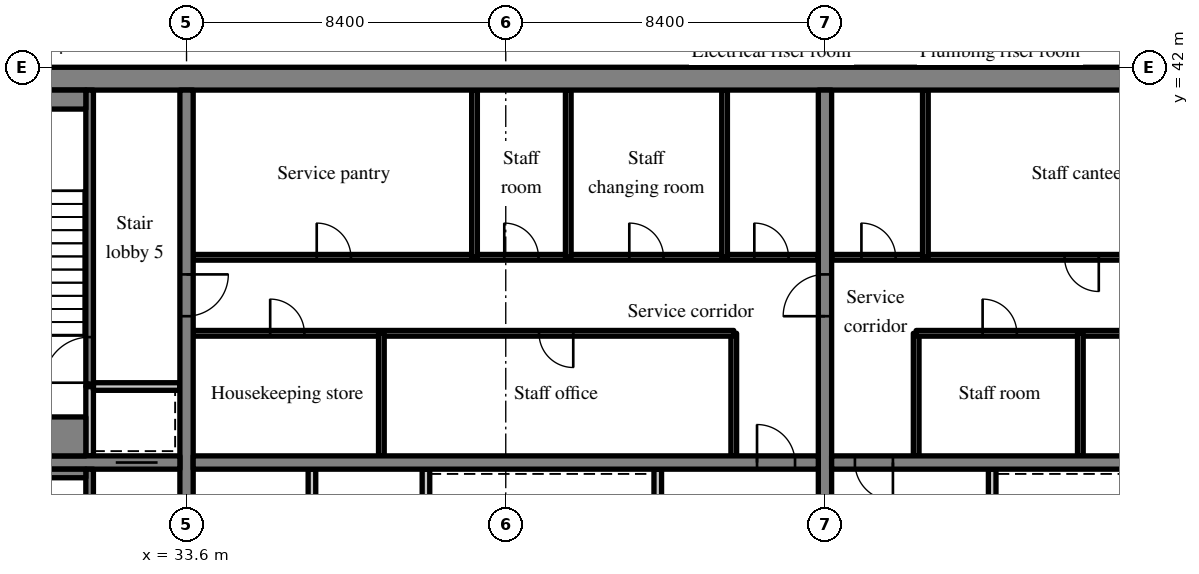
"""IFC4 building model, lengths in metres.
Left out: names, types, materials, properties, quantities, classifications, styles, units other than length and angle.
Written with IfcOpenShell. Run it as: python <this file> out.ifc"""

import sys

from ifc_helpers import new_model, si_unit, direction, frame, frame_2d, origin, place, context, subcontext, project, spatial, rectangle, extrude, source, transform, mapped, element, fill, save


model = new_model("IFC4")
c1 = context("Model", 3, precision=1e-05, world=origin(), true_north=direction((0.0, 1.0)))
c2 = subcontext(c1, "Body", "Model", "MODEL_VIEW")
j1 = project(units=[si_unit("LENGTHUNIT", "METRE"), si_unit("PLANEANGLEUNIT", "RADIAN")], contexts=[c1])
p1 = place(None, origin())
s1 = spatial("IfcSite", under=j1, at=p1, CompositionType="ELEMENT")
p2 = place(p1, origin())
s2 = spatial("IfcBuilding", under=s1, at=p2, CompositionType="ELEMENT")
p3 = place(p2, frame((0.0, 0.0, 214.0)))
s3 = spatial("IfcBuildingStorey", under=s2, at=p3, CompositionType="ELEMENT", Elevation=214.0)
m1 = source(origin(), c2, "Body", "SweptSolid", [
    extrude(rectangle(XDim=50.4, YDim=0.6, at=frame_2d((25.2, 0.0))), origin(), (0.0, 0.0, 1.0), 3.62),
])
p4 = place(p3, frame((25.2, 41.7, 0.0), z_axis=(0.0, 0.0, 1.0), x_axis=(1.0, 0.0, 0.0)))
e1 = element("IfcWall", 1, at=p4, inside=s3, PredefinedType="SHEAR", context=c2, shape_type="MappedRepresentation", body=[
    mapped(m1, transform((0.0, 0.0, 0.0), scale=1.0)),
])
m2 = source(origin(), c2, "Body", "SweptSolid", [
    extrude(rectangle(XDim=18.8, YDim=0.35, at=frame_2d((9.4, 0.0))), origin(), (0.0, 0.0, 1.0), 3.62),
])
p5 = place(p3, frame((33.6, 22.6, 0.0), z_axis=(0.0, 0.0, 1.0), x_axis=(0.0, 1.0, 0.0)))
e2 = element("IfcWall", 2, at=p5, inside=s3, PredefinedType="SHEAR", context=c2, shape_type="MappedRepresentation", body=[
    mapped(m2, transform((0.0, 0.0, 0.0), scale=1.0)),
])
m3 = source(origin(), c2, "Body", "SweptSolid", [
    extrude(rectangle(XDim=1.1, YDim=2.1, at=frame_2d((0.55, 1.05))), frame((0.0, 0.185, 0.0), z_axis=(0.0, -1.0, 0.0), x_axis=(1.0, 0.0, 0.0)), (0.0, 0.0, 1.0), 0.37),
])
p6 = place(p5, frame((12.85, 0.0, 0.0)))
e3 = element("IfcOpeningElement", 3, at=p6, cuts=e2, PredefinedType="OPENING", context=c2, shape_type="MappedRepresentation", body=[
    mapped(m3, transform((0.0, 0.0, 0.0), scale=1.0)),
])
p7 = place(p3, frame((50.4, 22.6, 0.0), z_axis=(0.0, 0.0, 1.0), x_axis=(0.0, 1.0, 0.0)))
e4 = element("IfcWall", 4, at=p7, inside=s3, PredefinedType="SHEAR", context=c2, shape_type="MappedRepresentation", body=[
    mapped(m2, transform((0.0, 0.0, 0.0), scale=1.0)),
])
p8 = place(p7, frame((12.85, 0.0, 0.0)))
e5 = element("IfcOpeningElement", 5, at=p8, cuts=e4, PredefinedType="OPENING", context=c2, shape_type="MappedRepresentation", body=[
    mapped(m3, transform((0.0, 0.0, 0.0), scale=1.0)),
])
m4 = source(origin(), c2, "Body", "SweptSolid", [
    extrude(rectangle(XDim=7.625, YDim=0.35, at=frame_2d((3.812, 0.0))), origin(), (0.0, 0.0, 1.0), 3.62),
])
p9 = place(p3, frame((25.8, 31.6, 0.0), z_axis=(0.0, 0.0, 1.0), x_axis=(1.0, 0.0, 0.0)))
e6 = element("IfcWall", 6, at=p9, inside=s3, PredefinedType="SHEAR", context=c2, shape_type="MappedRepresentation", body=[
    mapped(m4, transform((0.0, 0.0, 0.0), scale=1.0)),
])
p10 = place(p9, frame((5.938, 0.0, 0.0)))
e7 = element("IfcOpeningElement", 7, at=p10, cuts=e6, PredefinedType="OPENING", context=c2, shape_type="MappedRepresentation", body=[
    mapped(m3, transform((0.0, 0.0, 0.0), scale=1.0)),
])
m5 = source(origin(), c2, "Body", "SweptSolid", [
    extrude(rectangle(XDim=16.45, YDim=0.35, at=frame_2d((8.225, 0.0))), origin(), (0.0, 0.0, 1.0), 3.62),
])
p11 = place(p3, frame((33.775, 31.6, 0.0), z_axis=(0.0, 0.0, 1.0), x_axis=(1.0, 0.0, 0.0)))
e8 = element("IfcWall", 8, at=p11, inside=s3, PredefinedType="SHEAR", context=c2, shape_type="MappedRepresentation", body=[
    mapped(m5, transform((0.0, 0.0, 0.0), scale=1.0)),
])
m6 = source(origin(), c2, "Body", "SweptSolid", [
    extrude(rectangle(XDim=1.0, YDim=2.1, at=frame_2d((0.5, 1.05))), frame((0.0, 0.185, 0.0), z_axis=(0.0, -1.0, 0.0), x_axis=(1.0, 0.0, 0.0)), (0.0, 0.0, 1.0), 0.37),
])
p12 = place(p11, frame((14.837, 0.0, 0.0)))
e9 = element("IfcOpeningElement", 9, at=p12, cuts=e8, PredefinedType="OPENING", context=c2, shape_type="MappedRepresentation", body=[
    mapped(m6, transform((0.0, 0.0, 0.0), scale=1.0)),
])
m7 = source(origin(), c2, "Body", "SweptSolid", [
    extrude(rectangle(XDim=16.45, YDim=0.35, at=frame_2d((8.225, 0.0))), origin(), (0.0, 0.0, 1.0), 3.62),
])
p13 = place(p3, frame((50.575, 31.6, 0.0), z_axis=(0.0, 0.0, 1.0), x_axis=(1.0, 0.0, 0.0)))
e10 = element("IfcWall", 10, at=p13, inside=s3, PredefinedType="SHEAR", context=c2, shape_type="MappedRepresentation", body=[
    mapped(m7, transform((0.0, 0.0, 0.0), scale=1.0)),
])
p14 = place(p13, frame((0.613, 0.0, 0.0)))
e11 = element("IfcOpeningElement", 11, at=p14, cuts=e10, PredefinedType="OPENING", context=c2, shape_type="MappedRepresentation", body=[
    mapped(m6, transform((0.0, 0.0, 0.0), scale=1.0)),
])
m8 = source(origin(), c2, "Body", "SweptSolid", [
    extrude(rectangle(XDim=8.825, YDim=0.2, at=frame_2d((4.413, 0.0))), origin(), (0.0, 0.0, 1.0), 3.62),
])
p15 = place(p3, frame((39.9, 22.6, 0.0), z_axis=(0.0, 0.0, 1.0), x_axis=(0.0, 1.0, 0.0)))
e12 = element("IfcWall", 12, at=p15, inside=s3, PredefinedType="PARTITIONING", context=c2, shape_type="MappedRepresentation", body=[
    mapped(m8, transform((0.0, 0.0, 0.0), scale=1.0)),
])
m9 = source(origin(), c2, "Body", "SweptSolid", [
    extrude(rectangle(XDim=0.9, YDim=2.1, at=frame_2d((0.45, 1.05))), frame((0.0, 0.11, 0.0), z_axis=(0.0, -1.0, 0.0), x_axis=(1.0, 0.0, 0.0)), (0.0, 0.0, 1.0), 0.22),
])
p16 = place(p15, frame((3.95, 0.0, 0.0)))
e13 = element("IfcOpeningElement", 13, at=p16, cuts=e12, PredefinedType="OPENING", context=c2, shape_type="MappedRepresentation", body=[
    mapped(m9, transform((0.0, 0.0, 0.0), scale=1.0)),
])
m10 = source(origin(), c2, "Body", "SweptSolid", [
    extrude(rectangle(XDim=2.625, YDim=0.2, at=frame_2d((1.312, 0.0))), origin(), (0.0, 0.0, 1.0), 3.62),
])
p17 = place(p3, frame((46.0, 28.8, 0.0), z_axis=(0.0, 0.0, 1.0), x_axis=(0.0, 1.0, 0.0)))
e14 = element("IfcWall", 14, at=p17, inside=s3, PredefinedType="SOLIDWALL", context=c2, shape_type="MappedRepresentation", body=[
    mapped(m10, transform((0.0, 0.0, 0.0), scale=1.0)),
])
p18 = place(p3, frame((36.9, 22.6, 0.0), z_axis=(0.0, 0.0, 1.0), x_axis=(0.0, 1.0, 0.0)))
e15 = element("IfcWall", 15, at=p18, inside=s3, PredefinedType="PARTITIONING", context=c2, shape_type="MappedRepresentation", body=[
    mapped(m8, transform((0.0, 0.0, 0.0), scale=1.0)),
])
m11 = source(origin(), c2, "Body", "SweptSolid", [
    extrude(rectangle(XDim=3.225, YDim=0.15, at=frame_2d((1.613, 0.0))), origin(), (0.0, 0.0, 1.0), 3.62),
])
p19 = place(p3, frame((48.0, 31.775, 0.0), z_axis=(0.0, 0.0, 1.0), x_axis=(0.0, 1.0, 0.0)))
e16 = element("IfcWall", 16, at=p19, inside=s3, PredefinedType="PARTITIONING", context=c2, shape_type="MappedRepresentation", body=[
    mapped(m11, transform((0.0, 0.0, 0.0), scale=1.0)),
])
m12 = source(origin(), c2, "Body", "SweptSolid", [
    extrude(rectangle(XDim=14.225, YDim=0.15, at=frame_2d((7.113, 0.0))), origin(), (0.0, 0.0, 1.0), 3.62),
])
p20 = place(p3, frame((33.775, 35.0, 0.0), z_axis=(0.0, 0.0, 1.0), x_axis=(1.0, 0.0, 0.0)))
e17 = element("IfcWall", 17, at=p20, inside=s3, PredefinedType="PARTITIONING", context=c2, shape_type="MappedRepresentation", body=[
    mapped(m12, transform((0.0, 0.0, 0.0), scale=1.0)),
])
m13 = source(origin(), c2, "Body", "SweptSolid", [
    extrude(rectangle(XDim=0.9, YDim=2.1, at=frame_2d((0.45, 1.05))), frame((0.0, 0.085, 0.0), z_axis=(0.0, -1.0, 0.0), x_axis=(1.0, 0.0, 0.0)), (0.0, 0.0, 1.0), 0.17),
])
p21 = place(p20, frame((2.026, 0.0, 0.0)))
e18 = element("IfcOpeningElement", 18, at=p21, cuts=e17, PredefinedType="OPENING", context=c2, shape_type="MappedRepresentation", body=[
    mapped(m13, transform((0.0, 0.0, 0.0), scale=1.0)),
])
p22 = place(p20, frame((9.101, 0.0, 0.0)))
e19 = element("IfcOpeningElement", 19, at=p22, cuts=e17, PredefinedType="OPENING", context=c2, shape_type="MappedRepresentation", body=[
    mapped(m13, transform((0.0, 0.0, 0.0), scale=1.0)),
])
m14 = source(origin(), c2, "Body", "SweptSolid", [
    extrude(rectangle(XDim=16.45, YDim=0.15, at=frame_2d((8.225, 0.0))), origin(), (0.0, 0.0, 1.0), 3.62),
])
p23 = place(p3, frame((33.775, 37.0, 0.0), z_axis=(0.0, 0.0, 1.0), x_axis=(1.0, 0.0, 0.0)))
e20 = element("IfcWall", 20, at=p23, inside=s3, PredefinedType="PARTITIONING", context=c2, shape_type="MappedRepresentation", body=[
    mapped(m14, transform((0.0, 0.0, 0.0), scale=1.0)),
])
p24 = place(p23, frame((3.251, 0.0, 0.0)))
e21 = element("IfcOpeningElement", 21, at=p24, cuts=e20, PredefinedType="OPENING", context=c2, shape_type="MappedRepresentation", body=[
    mapped(m13, transform((0.0, 0.0, 0.0), scale=1.0)),
])
p25 = place(p23, frame((8.186, 0.0, 0.0)))
e22 = element("IfcOpeningElement", 22, at=p25, cuts=e20, PredefinedType="OPENING", context=c2, shape_type="MappedRepresentation", body=[
    mapped(m13, transform((0.0, 0.0, 0.0), scale=1.0)),
])
p26 = place(p23, frame((11.476, 0.0, 0.0)))
e23 = element("IfcOpeningElement", 23, at=p26, cuts=e20, PredefinedType="OPENING", context=c2, shape_type="MappedRepresentation", body=[
    mapped(m13, transform((0.0, 0.0, 0.0), scale=1.0)),
])
p27 = place(p23, frame((14.766, 0.0, 0.0)))
e24 = element("IfcOpeningElement", 24, at=p27, cuts=e20, PredefinedType="OPENING", context=c2, shape_type="MappedRepresentation", body=[
    mapped(m13, transform((0.0, 0.0, 0.0), scale=1.0)),
])
p28 = place(p3, frame((38.727, 31.775, 0.0), z_axis=(0.0, 0.0, 1.0), x_axis=(0.0, 1.0, 0.0)))
e25 = element("IfcWall", 25, at=p28, inside=s3, PredefinedType="PARTITIONING", context=c2, shape_type="MappedRepresentation", body=[
    mapped(m11, transform((0.0, 0.0, 0.0), scale=1.0)),
])
m15 = source(origin(), c2, "Body", "SweptSolid", [
    extrude(rectangle(XDim=4.4, YDim=0.15, at=frame_2d((2.2, 0.0))), origin(), (0.0, 0.0, 1.0), 3.62),
])
for number, where, z_axis, x_axis in (
    (26, (41.178, 37.0, 0.0), (0.0, 0.0, 1.0), (0.0, 1.0, 0.0)),
    (27, (43.645, 37.0, 0.0), (0.0, 0.0, 1.0), (0.0, 1.0, 0.0)),
    (28, (47.758, 37.0, 0.0), (0.0, 0.0, 1.0), (0.0, 1.0, 0.0)),
):
    element("IfcWall", number, at=place(p3, frame(where, z_axis=z_axis, x_axis=x_axis)), inside=s3, PredefinedType="PARTITIONING", context=c2, shape_type="MappedRepresentation", body=[
        mapped(m15, transform((0.0, 0.0, 0.0), scale=1.0)),
    ])
p29 = place(p3, frame((54.8, 28.8, 0.0), z_axis=(0.0, 0.0, 1.0), x_axis=(0.0, 1.0, 0.0)))
e29 = element("IfcWall", 29, at=p29, inside=s3, PredefinedType="SOLIDWALL", context=c2, shape_type="MappedRepresentation", body=[
    mapped(m10, transform((0.0, 0.0, 0.0), scale=1.0)),
])
p30 = place(p3, frame((52.8, 31.775, 0.0), z_axis=(0.0, 0.0, 1.0), x_axis=(0.0, 1.0, 0.0)))
e30 = element("IfcWall", 30, at=p30, inside=s3, PredefinedType="PARTITIONING", context=c2, shape_type="MappedRepresentation", body=[
    mapped(m11, transform((0.0, 0.0, 0.0), scale=1.0)),
])
m16 = source(origin(), c2, "Body", "SweptSolid", [
    extrude(rectangle(XDim=14.225, YDim=0.15, at=frame_2d((7.112, 0.0))), origin(), (0.0, 0.0, 1.0), 3.62),
])
p31 = place(p3, frame((67.025, 35.0, 0.0), z_axis=(0.0, 0.0, 1.0), x_axis=(-1.0, 0.0, 0.0)))
e31 = element("IfcWall", 31, at=p31, inside=s3, PredefinedType="PARTITIONING", context=c2, shape_type="MappedRepresentation", body=[
    mapped(m16, transform((0.0, 0.0, 0.0), scale=1.0)),
])
p32 = place(p31, frame((0.965, 0.0, 0.0)))
e32 = element("IfcOpeningElement", 32, at=p32, cuts=e31, PredefinedType="OPENING", context=c2, shape_type="MappedRepresentation", body=[
    mapped(m13, transform((0.0, 0.0, 0.0), scale=1.0)),
])
p33 = place(p31, frame((5.918, 0.0, 0.0)))
e33 = element("IfcOpeningElement", 33, at=p33, cuts=e31, PredefinedType="OPENING", context=c2, shape_type="MappedRepresentation", body=[
    mapped(m13, transform((0.0, 0.0, 0.0), scale=1.0)),
])
p34 = place(p31, frame((11.577, 0.0, 0.0)))
e34 = element("IfcOpeningElement", 34, at=p34, cuts=e31, PredefinedType="OPENING", context=c2, shape_type="MappedRepresentation", body=[
    mapped(m13, transform((0.0, 0.0, 0.0), scale=1.0)),
])
m17 = source(origin(), c2, "Body", "SweptSolid", [
    extrude(rectangle(XDim=16.45, YDim=0.15, at=frame_2d((8.225, 0.0))), origin(), (0.0, 0.0, 1.0), 3.62),
])
p35 = place(p3, frame((67.025, 37.0, 0.0), z_axis=(0.0, 0.0, 1.0), x_axis=(-1.0, 0.0, 0.0)))
e35 = element("IfcWall", 35, at=p35, inside=s3, PredefinedType="PARTITIONING", context=c2, shape_type="MappedRepresentation", body=[
    mapped(m17, transform((0.0, 0.0, 0.0), scale=1.0)),
])
p36 = place(p35, frame((0.784, 0.0, 0.0)))
e36 = element("IfcOpeningElement", 36, at=p36, cuts=e35, PredefinedType="OPENING", context=c2, shape_type="MappedRepresentation", body=[
    mapped(m13, transform((0.0, 0.0, 0.0), scale=1.0)),
])
p37 = place(p35, frame((3.663, 0.0, 0.0)))
e37 = element("IfcOpeningElement", 37, at=p37, cuts=e35, PredefinedType="OPENING", context=c2, shape_type="MappedRepresentation", body=[
    mapped(m13, transform((0.0, 0.0, 0.0), scale=1.0)),
])
p38 = place(p35, frame((9.42, 0.0, 0.0)))
e38 = element("IfcOpeningElement", 38, at=p38, cuts=e35, PredefinedType="OPENING", context=c2, shape_type="MappedRepresentation", body=[
    mapped(m13, transform((0.0, 0.0, 0.0), scale=1.0)),
])
p39 = place(p35, frame((14.766, 0.0, 0.0)))
e39 = element("IfcOpeningElement", 39, at=p39, cuts=e35, PredefinedType="OPENING", context=c2, shape_type="MappedRepresentation", body=[
    mapped(m13, transform((0.0, 0.0, 0.0), scale=1.0)),
])
p40 = place(p3, frame((57.12, 31.775, 0.0), z_axis=(0.0, 0.0, 1.0), x_axis=(0.0, 1.0, 0.0)))
e40 = element("IfcWall", 40, at=p40, inside=s3, PredefinedType="PARTITIONING", context=c2, shape_type="MappedRepresentation", body=[
    mapped(m11, transform((0.0, 0.0, 0.0), scale=1.0)),
])
p41 = place(p3, frame((53.042, 37.0, 0.0), z_axis=(0.0, 0.0, 1.0), x_axis=(0.0, 1.0, 0.0)))
e41 = element("IfcWall", 41, at=p41, inside=s3, PredefinedType="PARTITIONING", context=c2, shape_type="MappedRepresentation", body=[
    mapped(m15, transform((0.0, 0.0, 0.0), scale=1.0)),
])
m18 = source(origin(), c2, "Body", "SweptSolid", [
    extrude(rectangle(XDim=8.825, YDim=0.2, at=frame_2d((4.413, 0.0))), origin(), (0.0, 0.0, 1.0), 3.62),
])
p42 = place(p3, frame((31.05, 22.6, 0.0), z_axis=(0.0, 0.0, 1.0), x_axis=(0.0, 1.0, 0.0)))
e42 = element("IfcWall", 42, at=p42, inside=s3, PredefinedType="SOLIDWALL", context=c2, shape_type="MappedRepresentation", body=[
    mapped(m18, transform((0.0, 0.0, 0.0), scale=1.0)),
])
m19 = source(origin(), c2, "Body", "SweptSolid", [
    extrude(rectangle(XDim=1.2, YDim=2.1, at=frame_2d((0.6, 1.05))), frame((0.0, 0.11, 0.0), z_axis=(0.0, -1.0, 0.0), x_axis=(1.0, 0.0, 0.0)), (0.0, 0.0, 1.0), 0.22),
])
p43 = place(p42, frame((1.0, 0.0, 0.0)))
e43 = element("IfcOpeningElement", 43, at=p43, cuts=e42, PredefinedType="OPENING", context=c2, shape_type="MappedRepresentation", body=[
    mapped(m19, transform((0.0, 0.0, 0.0), scale=1.0)),
])
m20 = source(origin(), c2, "Body", "SweptSolid", [
    extrude(rectangle(XDim=1.825, YDim=0.2, at=frame_2d((0.913, 0.0))), origin(), (0.0, 0.0, 1.0), 3.62),
])
p44 = place(p3, frame((31.05, 31.775, 0.0), z_axis=(0.0, 0.0, 1.0), x_axis=(0.0, 1.0, 0.0)))
e44 = element("IfcWall", 44, at=p44, inside=s3, PredefinedType="SOLIDWALL", context=c2, shape_type="MappedRepresentation", body=[
    mapped(m20, transform((0.0, 0.0, 0.0), scale=1.0)),
])
m21 = source(origin(), c2, "Body", "SweptSolid", [
    extrude(rectangle(XDim=2.275, YDim=0.2, at=frame_2d((1.138, 0.0))), origin(), (0.0, 0.0, 1.0), 3.62),
])
p45 = place(p3, frame((31.15, 33.6, 0.0), z_axis=(0.0, 0.0, 1.0), x_axis=(1.0, 0.0, 0.0)))
e45 = element("IfcWall", 45, at=p45, inside=s3, PredefinedType="SOLIDWALL", context=c2, shape_type="MappedRepresentation", body=[
    mapped(m21, transform((0.0, 0.0, 0.0), scale=1.0)),
])
m22 = source(origin(), c2, "Body", "SweptSolid", [
    extrude(rectangle(XDim=7.8, YDim=0.2, at=frame_2d((3.9, 0.0))), origin(), (0.0, 0.0, 1.0), 3.62),
])
p46 = place(p3, frame((31.05, 33.6, 0.0), z_axis=(0.0, 0.0, 1.0), x_axis=(0.0, 1.0, 0.0)))
e46 = element("IfcWall", 46, at=p46, inside=s3, PredefinedType="SOLIDWALL", context=c2, shape_type="MappedRepresentation", body=[
    mapped(m22, transform((0.0, 0.0, 0.0), scale=1.0)),
])
p47 = place(p46, frame((0.1, 0.0, 0.0)))
e47 = element("IfcOpeningElement", 47, at=p47, cuts=e46, PredefinedType="OPENING", context=c2, shape_type="MappedRepresentation", body=[
    mapped(m19, transform((0.0, 0.0, 0.0), scale=1.0)),
])
m23 = source(origin(), c2, "Body", "SweptSolid", [
    extrude(rectangle(XDim=5.15, YDim=0.225, at=frame_2d((2.575, 0.0))), origin(), (0.0, 0.0, 1.0), 3.62),
])
p48 = place(p3, frame((25.8, 31.312, 0.0), z_axis=(0.0, 0.0, 1.0), x_axis=(1.0, 0.0, 0.0)))
e48 = element("IfcWall", 48, at=p48, inside=s3, PredefinedType="SOLIDWALL", context=c2, shape_type="MappedRepresentation", body=[
    mapped(m23, transform((0.0, 0.0, 0.0), scale=1.0)),
])
m24 = source(origin(), c2, "Body", "SweptSolid", [
    extrude(rectangle(XDim=5.15, YDim=0.5, at=frame_2d((2.575, 0.0))), origin(), (0.0, 0.0, 1.0), 3.62),
])
p49 = place(p3, frame((25.8, 41.15, 0.0), z_axis=(0.0, 0.0, 1.0), x_axis=(1.0, 0.0, 0.0)))
e49 = element("IfcWall", 49, at=p49, inside=s3, PredefinedType="SOLIDWALL", context=c2, shape_type="MappedRepresentation", body=[
    mapped(m24, transform((0.0, 0.0, 0.0), scale=1.0)),
])
m25 = source(origin(), c2, "Body", "SweptSolid", [
    extrude(rectangle(XDim=5.15, YDim=1.025, at=frame_2d((2.575, 0.0))), origin(), (0.0, 0.0, 1.0), 3.62),
])
p50 = place(p3, frame((25.8, 32.287, 0.0), z_axis=(0.0, 0.0, 1.0), x_axis=(1.0, 0.0, 0.0)))
e50 = element("IfcWall", 50, at=p50, inside=s3, PredefinedType="SOLIDWALL", context=c2, shape_type="MappedRepresentation", body=[
    mapped(m25, transform((0.0, 0.0, 0.0), scale=1.0)),
])
m26 = source(origin(), c2, "Body", "SweptSolid", [
    extrude(rectangle(XDim=1.0, YDim=2.1, at=frame_2d((0.5, 1.05))), frame((0.0, 0.025, 0.0), z_axis=(0.0, -1.0, 0.0), x_axis=(1.0, 0.0, 0.0)), (0.0, 0.0, 1.0), 0.05),
])
p51 = place(p12, origin())
e51 = element("IfcDoor", 51, at=p51, inside=s3, OperationType="SINGLE_SWING_LEFT", PredefinedType="DOOR", context=c2, shape_type="MappedRepresentation", body=[
    mapped(m26, transform((0.0, 0.0, 0.0), scale=1.0)),
])
fill(e9, e51)
m27 = source(origin(), c2, "Body", "SweptSolid", [
    extrude(rectangle(XDim=0.9, YDim=2.1, at=frame_2d((0.45, 1.05))), frame((0.0, 0.025, 0.0), z_axis=(0.0, -1.0, 0.0), x_axis=(1.0, 0.0, 0.0)), (0.0, 0.0, 1.0), 0.05),
])
p52 = place(p21, origin())
e52 = element("IfcDoor", 52, at=p52, inside=s3, OperationType="SINGLE_SWING_LEFT", PredefinedType="DOOR", context=c2, shape_type="MappedRepresentation", body=[
    mapped(m27, transform((0.0, 0.0, 0.0), scale=1.0)),
])
fill(e18, e52)
p53 = place(p22, origin())
e53 = element("IfcDoor", 53, at=p53, inside=s3, OperationType="SINGLE_SWING_RIGHT", PredefinedType="DOOR", context=c2, shape_type="MappedRepresentation", body=[
    mapped(m27, transform((0.0, 0.0, 0.0), scale=1.0)),
])
fill(e19, e53)
p54 = place(p24, origin())
e54 = element("IfcDoor", 54, at=p54, inside=s3, OperationType="SINGLE_SWING_LEFT", PredefinedType="DOOR", context=c2, shape_type="MappedRepresentation", body=[
    mapped(m27, transform((0.0, 0.0, 0.0), scale=1.0)),
])
fill(e21, e54)
p55 = place(p25, origin())
e55 = element("IfcDoor", 55, at=p55, inside=s3, OperationType="SINGLE_SWING_LEFT", PredefinedType="DOOR", context=c2, shape_type="MappedRepresentation", body=[
    mapped(m27, transform((0.0, 0.0, 0.0), scale=1.0)),
])
fill(e22, e55)
p56 = place(p26, origin())
e56 = element("IfcDoor", 56, at=p56, inside=s3, OperationType="SINGLE_SWING_LEFT", PredefinedType="DOOR", context=c2, shape_type="MappedRepresentation", body=[
    mapped(m27, transform((0.0, 0.0, 0.0), scale=1.0)),
])
fill(e23, e56)
p57 = place(p27, origin())
e57 = element("IfcDoor", 57, at=p57, inside=s3, OperationType="SINGLE_SWING_LEFT", PredefinedType="DOOR", context=c2, shape_type="MappedRepresentation", body=[
    mapped(m27, transform((0.0, 0.0, 0.0), scale=1.0)),
])
fill(e24, e57)
p58 = place(p14, origin())
e58 = element("IfcDoor", 58, at=p58, inside=s3, OperationType="SINGLE_SWING_RIGHT", PredefinedType="DOOR", context=c2, shape_type="MappedRepresentation", body=[
    mapped(m26, transform((0.0, 0.0, 0.0), scale=1.0)),
])
fill(e11, e58)
p59 = place(p34, origin())
e59 = element("IfcDoor", 59, at=p59, inside=s3, OperationType="SINGLE_SWING_RIGHT", PredefinedType="DOOR", context=c2, shape_type="MappedRepresentation", body=[
    mapped(m27, transform((0.0, 0.0, 0.0), scale=1.0)),
])
fill(e34, e59)
p60 = place(p38, origin())
e60 = element("IfcDoor", 60, at=p60, inside=s3, OperationType="SINGLE_SWING_LEFT", PredefinedType="DOOR", context=c2, shape_type="MappedRepresentation", body=[
    mapped(m27, transform((0.0, 0.0, 0.0), scale=1.0)),
])
fill(e38, e60)
p61 = place(p39, origin())
e61 = element("IfcDoor", 61, at=p61, inside=s3, OperationType="SINGLE_SWING_RIGHT", PredefinedType="DOOR", context=c2, shape_type="MappedRepresentation", body=[
    mapped(m27, transform((0.0, 0.0, 0.0), scale=1.0)),
])
fill(e39, e61)
m28 = source(origin(), c2, "Body", "SweptSolid", [
    extrude(rectangle(XDim=1.1, YDim=2.1, at=frame_2d((0.55, 1.05))), frame((0.0, 0.025, 0.0), z_axis=(0.0, -1.0, 0.0), x_axis=(1.0, 0.0, 0.0)), (0.0, 0.0, 1.0), 0.05),
])
p62 = place(p10, origin())
e62 = element("IfcDoor", 62, at=p62, inside=s3, OperationType="SLIDING_TO_LEFT", PredefinedType="DOOR", context=c2, shape_type="MappedRepresentation", body=[
    mapped(m28, transform((0.0, 0.0, 0.0), scale=1.0)),
])
fill(e7, e62)
m29 = source(origin(), c2, "Body", "SweptSolid", [
    extrude(rectangle(XDim=1.2, YDim=2.1, at=frame_2d((0.6, 1.05))), frame((0.0, 0.025, 0.0), z_axis=(0.0, -1.0, 0.0), x_axis=(1.0, 0.0, 0.0)), (0.0, 0.0, 1.0), 0.05),
])
p63 = place(p47, origin())
e63 = element("IfcDoor", 63, at=p63, inside=s3, OperationType="SINGLE_SWING_LEFT", PredefinedType="DOOR", context=c2, shape_type="MappedRepresentation", body=[
    mapped(m29, transform((0.0, 0.0, 0.0), scale=1.0)),
])
fill(e47, e63)
p64 = place(p6, origin())
e64 = element("IfcDoor", 64, at=p64, inside=s3, OperationType="SINGLE_SWING_RIGHT", PredefinedType="DOOR", context=c2, shape_type="MappedRepresentation", body=[
    mapped(m28, transform((0.0, 0.0, 0.0), scale=1.0)),
])
fill(e3, e64)
p65 = place(p8, origin())
e65 = element("IfcDoor", 65, at=p65, inside=s3, OperationType="SINGLE_SWING_LEFT", PredefinedType="DOOR", context=c2, shape_type="MappedRepresentation", body=[
    mapped(m28, transform((0.0, 0.0, 0.0), scale=1.0)),
])
fill(e5, e65)
save(model, sys.argv[1])
